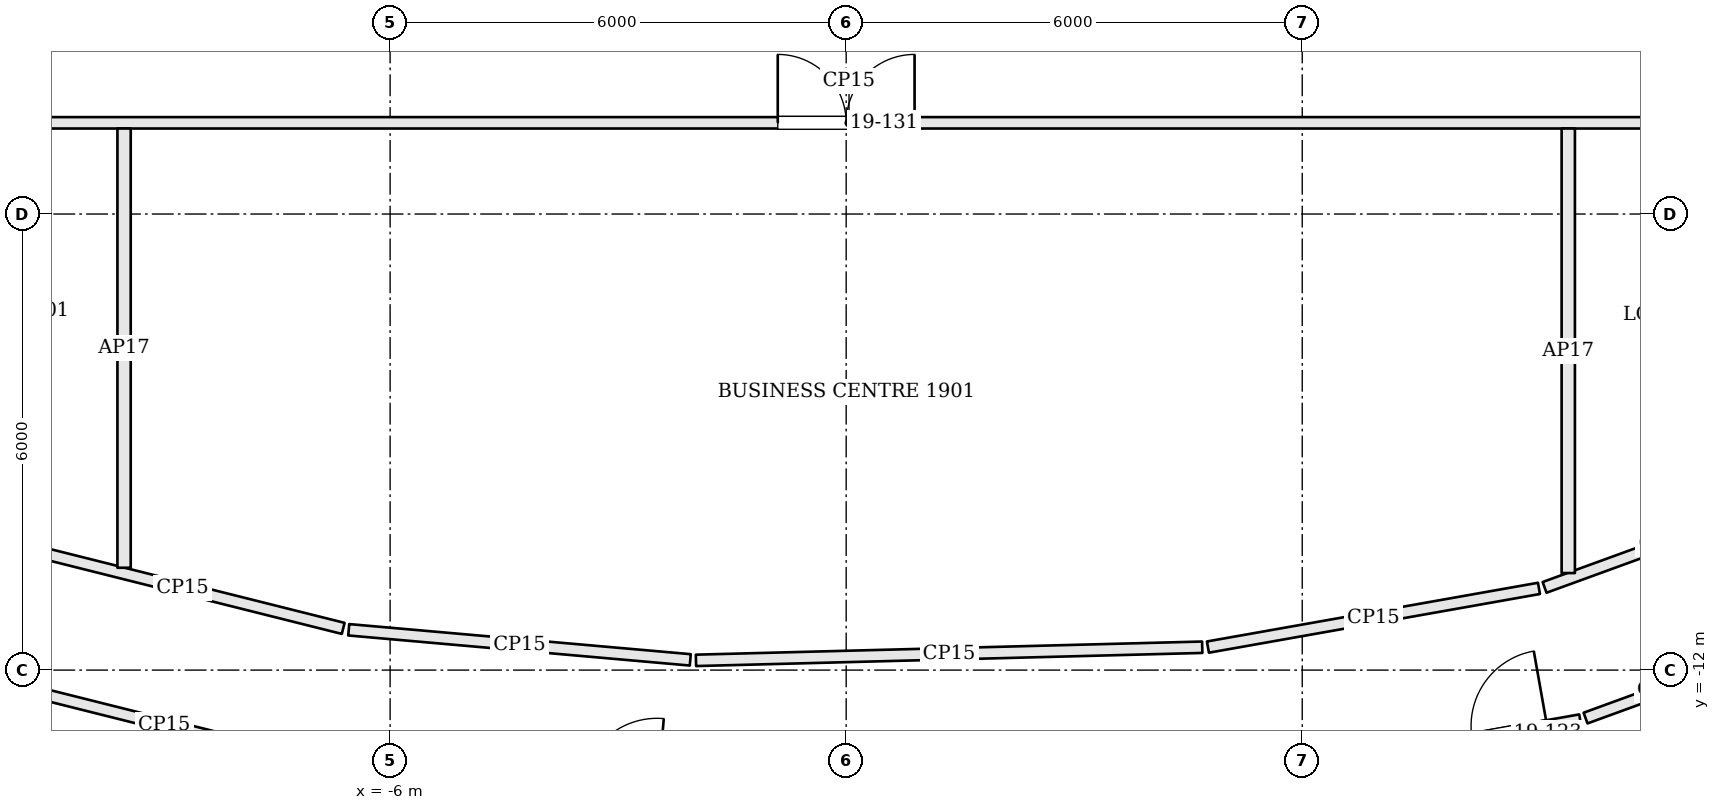
"""IFC4 building model, lengths in metres.
Left out: names, types, materials, properties, quantities, classifications, styles, units other than length and angle.
Written with IfcOpenShell. Run it as: python <this file> out.ifc"""

import sys

from ifc_helpers import new_model, si_unit, direction, frame, frame_2d, origin, place, context, subcontext, project, spatial, rectangle, extrude, element, fill, save


model = new_model("IFC4")
c1 = context("Model", 3, precision=1e-05, world=origin(), true_north=direction((0.0, 1.0)))
c2 = subcontext(c1, "Body", "Model", "MODEL_VIEW")
j1 = project(units=[si_unit("LENGTHUNIT", "METRE"), si_unit("PLANEANGLEUNIT", "RADIAN")], contexts=[c1])
p1 = place(None, origin())
s1 = spatial("IfcSite", under=j1, at=p1, CompositionType="ELEMENT")
p2 = place(p1, origin())
s2 = spatial("IfcBuilding", under=s1, at=p2, CompositionType="ELEMENT")
p3 = place(p2, frame((0.0, 0.0, 85.2)))
s3 = spatial("IfcBuildingStorey", under=s2, at=p3, CompositionType="ELEMENT", Elevation=85.2)
p4 = place(p3, frame((-11.101, -12.183, 0.0), z_axis=(0.0, 0.0, 1.0), x_axis=(0.969991763536, -0.24313777714, 0.0)))
e1 = element("IfcWall", 1, at=p4, inside=s3, PredefinedType="PARTITIONING", context=c2, shape_type="SweptSolid", body=[
    extrude(rectangle(XDim=4.388, YDim=0.15, at=frame_2d((2.194, 0.0))), origin(), (0.0, 0.0, 1.0), 2.784),
])
p5 = place(p3, frame((5.015, -13.48, 0.0), z_axis=(0.0, 0.0, 1.0), x_axis=(0.984637772103, 0.174609443467, 0.0)))
e2 = element("IfcWall", 2, at=p5, inside=s3, PredefinedType="PARTITIONING", context=c2, shape_type="SweptSolid", body=[
    extrude(rectangle(XDim=4.715, YDim=0.15, at=frame_2d((2.357, 0.0))), origin(), (0.0, 0.0, 1.0), 2.784),
])
p6 = place(p5, frame((3.272, 0.0, 0.0)))
e3 = element("IfcOpeningElement", 3, at=p6, cuts=e2, PredefinedType="OPENING", context=c2, shape_type="SweptSolid", body=[
    extrude(rectangle(XDim=1.0, YDim=2.1, at=frame_2d((0.5, 1.05))), frame((0.0, 0.085, 0.0), z_axis=(0.0, -1.0, 0.0), x_axis=(1.0, 0.0, 0.0)), (0.0, 0.0, 1.0), 0.17),
])
p7 = place(p3, frame((9.728, -12.631, 0.0), z_axis=(0.0, 0.0, 1.0), x_axis=(0.939625968265, 0.342203214133, 0.0)))
e4 = element("IfcWall", 4, at=p7, inside=s3, PredefinedType="PARTITIONING", context=c2, shape_type="SweptSolid", body=[
    extrude(rectangle(XDim=2.172, YDim=0.15, at=frame_2d((1.086, 0.0))), origin(), (0.0, 0.0, 1.0), 2.784),
])
p8 = place(p3, frame((12.353, -9.76, 0.0), z_axis=(0.0, 0.0, 1.0), x_axis=(-0.939632450309, -0.342185415127, 0.0)))
e5 = element("IfcWall", 5, at=p8, inside=s3, PredefinedType="PARTITIONING", context=c2, shape_type="SweptSolid", body=[
    extrude(rectangle(XDim=3.368, YDim=0.15, at=frame_2d((1.684, 0.0))), origin(), (0.0, 0.0, 1.0), 2.784),
])
p9 = place(p3, frame((9.115, -10.925, 0.0), z_axis=(0.0, 0.0, 1.0), x_axis=(-0.984632605417, -0.174638576352, 0.0)))
e6 = element("IfcWall", 6, at=p9, inside=s3, PredefinedType="PARTITIONING", context=c2, shape_type="SweptSolid", body=[
    extrude(rectangle(XDim=4.423, YDim=0.15, at=frame_2d((2.211, 0.0))), origin(), (0.0, 0.0, 1.0), 2.784),
])
p10 = place(p3, frame((4.684, -11.699, 0.0), z_axis=(0.0, 0.0, 1.0), x_axis=(-0.999663438204, -0.025942442425, 0.0)))
e7 = element("IfcWall", 7, at=p10, inside=s3, PredefinedType="PARTITIONING", context=c2, shape_type="SweptSolid", body=[
    extrude(rectangle(XDim=6.663, YDim=0.15, at=frame_2d((3.332, 0.0))), origin(), (0.0, 0.0, 1.0), 2.784),
])
p11 = place(p3, frame((-2.051, -11.865, 0.0), z_axis=(0.0, 0.0, 1.0), x_axis=(-0.996139599493, 0.087783246245, 0.0)))
e8 = element("IfcWall", 8, at=p11, inside=s3, PredefinedType="PARTITIONING", context=c2, shape_type="SweptSolid", body=[
    extrude(rectangle(XDim=4.511, YDim=0.15, at=frame_2d((2.255, 0.0))), origin(), (0.0, 0.0, 1.0), 2.784),
])
p12 = place(p3, frame((-6.617, -11.451, 0.0), z_axis=(0.0, 0.0, 1.0), x_axis=(-0.969987441267, 0.243155020069, 0.0)))
e9 = element("IfcWall", 9, at=p12, inside=s3, PredefinedType="PARTITIONING", context=c2, shape_type="SweptSolid", body=[
    extrude(rectangle(XDim=4.359, YDim=0.15, at=frame_2d((2.179, 0.0))), origin(), (0.0, 0.0, 1.0), 2.784),
])
p13 = place(p3, frame((-14.725, -4.8, 0.0), z_axis=(0.0, 0.0, 1.0), x_axis=(1.0, 0.0, 0.0)))
e10 = element("IfcWall", 10, at=p13, inside=s3, PredefinedType="PARTITIONING", context=c2, shape_type="SweptSolid", body=[
    extrude(rectangle(XDim=29.525, YDim=0.15, at=frame_2d((14.763, 0.0))), origin(), (0.0, 0.0, 1.0), 2.784),
])
p14 = place(p13, frame((13.825, 0.0, 0.0)))
e11 = element("IfcOpeningElement", 11, at=p14, cuts=e10, PredefinedType="OPENING", context=c2, shape_type="SweptSolid", body=[
    extrude(rectangle(XDim=1.8, YDim=2.1, at=frame_2d((0.9, 1.05))), frame((0.0, 0.085, 0.0), z_axis=(0.0, -1.0, 0.0), x_axis=(1.0, 0.0, 0.0)), (0.0, 0.0, 1.0), 0.17),
])
p15 = place(p3, frame((-9.5, -10.654, 0.0), z_axis=(0.0, 0.0, 1.0), x_axis=(0.0, 1.0, 0.0)))
e12 = element("IfcWall", 12, at=p15, inside=s3, PredefinedType="PARTITIONING", context=c2, shape_type="SweptSolid", body=[
    extrude(rectangle(XDim=5.779, YDim=0.175, at=frame_2d((2.889, 0.0))), origin(), (0.0, 0.0, 1.0), 2.784),
])
p16 = place(p3, frame((9.5, -10.723, 0.0), z_axis=(0.0, 0.0, 1.0), x_axis=(0.0, 1.0, 0.0)))
e13 = element("IfcWall", 13, at=p16, inside=s3, PredefinedType="PARTITIONING", context=c2, shape_type="SweptSolid", body=[
    extrude(rectangle(XDim=5.848, YDim=0.175, at=frame_2d((2.924, 0.0))), origin(), (0.0, 0.0, 1.0), 2.784),
])
p17 = place(p6, origin())
e14 = element("IfcDoor", 14, at=p17, inside=s3, OperationType="SINGLE_SWING_RIGHT", PredefinedType="DOOR", context=c2, shape_type="SweptSolid", body=[
    extrude(rectangle(XDim=1.0, YDim=2.1, at=frame_2d((0.5, 1.05))), frame((0.0, 0.025, 0.0), z_axis=(0.0, -1.0, 0.0), x_axis=(1.0, 0.0, 0.0)), (0.0, 0.0, 1.0), 0.05),
])
fill(e3, e14)
p18 = place(p14, origin())
e15 = element("IfcDoor", 15, at=p18, inside=s3, OperationType="DOUBLE_DOOR_SINGLE_SWING", PredefinedType="DOOR", context=c2, shape_type="SweptSolid", body=[
    extrude(rectangle(XDim=1.8, YDim=2.1, at=frame_2d((0.9, 1.05))), frame((0.0, 0.025, 0.0), z_axis=(0.0, -1.0, 0.0), x_axis=(1.0, 0.0, 0.0)), (0.0, 0.0, 1.0), 0.05),
])
fill(e11, e15)
save(model, sys.argv[1])
